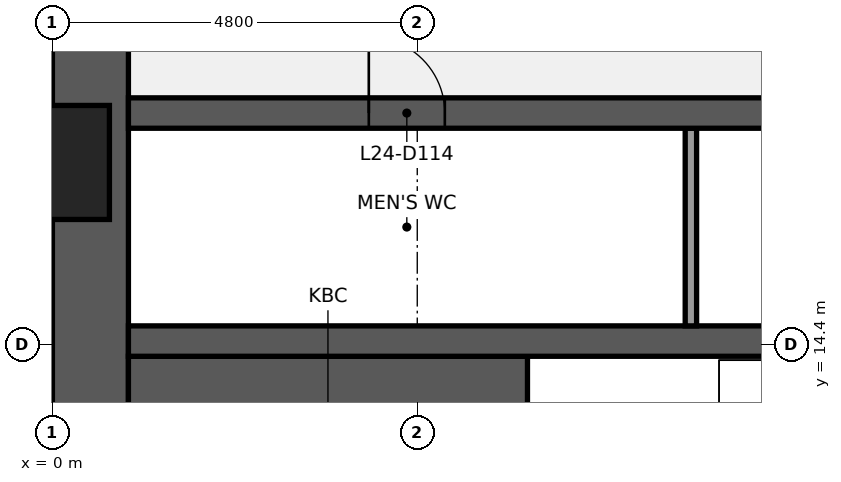
"""IFC4 building model, lengths in metres.
Left out: names, types, materials, properties, quantities, classifications, styles, units other than length and angle.
Written with IfcOpenShell. Run it as: python <this file> out.ifc"""

import sys

from ifc_helpers import new_model, si_unit, direction, frame, frame_2d, origin, place, context, subcontext, project, spatial, rectangle, extrude, element, fill, save


model = new_model("IFC4")
c1 = context("Model", 3, precision=1e-05, world=origin(), true_north=direction((0.0, 1.0)))
c2 = subcontext(c1, "Body", "Model", "MODEL_VIEW")
j1 = project(units=[si_unit("LENGTHUNIT", "METRE"), si_unit("PLANEANGLEUNIT", "RADIAN")], contexts=[c1])
p1 = place(None, origin())
s1 = spatial("IfcSite", under=j1, at=p1, CompositionType="ELEMENT")
p2 = place(p1, origin())
s2 = spatial("IfcBuilding", under=s1, at=p2, CompositionType="ELEMENT")
p3 = place(p2, frame((0.0, 0.0, 116.1)))
s3 = spatial("IfcBuildingStorey", under=s2, at=p3, CompositionType="ELEMENT", Elevation=116.1)
p4 = place(p3, frame((0.5, 9.6, 0.0), z_axis=(0.0, 0.0, 1.0), x_axis=(0.0, 1.0, 0.0)))
e1 = element("IfcWall", 1, at=p4, inside=s3, PredefinedType="SHEAR", context=c2, shape_type="SweptSolid", body=[
    extrude(rectangle(XDim=28.8, YDim=1.0, at=frame_2d((14.4, 0.0))), origin(), (0.0, 0.0, 1.0), 3.84),
])
p5 = place(p4, frame((8.85, 0.0, 0.9)))
e2 = element("IfcOpeningElement", 2, at=p5, cuts=e1, PredefinedType="OPENING", context=c2, shape_type="SweptSolid", body=[
    extrude(rectangle(XDim=1.5, YDim=1.5, at=frame_2d((0.75, 0.75))), frame((0.0, 0.51, 0.0), z_axis=(0.0, -1.0, 0.0), x_axis=(1.0, 0.0, 0.0)), (0.0, 0.0, 1.0), 1.02),
])
p6 = place(p4, frame((18.45, 0.0, 0.9)))
e3 = element("IfcOpeningElement", 3, at=p6, cuts=e1, PredefinedType="OPENING", context=c2, shape_type="SweptSolid", body=[
    extrude(rectangle(XDim=1.5, YDim=1.5, at=frame_2d((0.75, 0.75))), frame((0.0, 0.51, 0.0), z_axis=(0.0, -1.0, 0.0), x_axis=(1.0, 0.0, 0.0)), (0.0, 0.0, 1.0), 1.02),
])
p7 = place(p3, frame((1.0, 12.425, 0.0), z_axis=(0.0, 0.0, 1.0), x_axis=(1.0, 0.0, 0.0)))
e4 = element("IfcWall", 4, at=p7, inside=s3, PredefinedType="SHEAR", context=c2, shape_type="SweptSolid", body=[
    extrude(rectangle(XDim=5.25, YDim=3.65, at=frame_2d((2.625, 0.0))), origin(), (0.0, 0.0, 1.0), 3.84),
])
p8 = place(p3, frame((1.0, 14.45, 0.0), z_axis=(0.0, 0.0, 1.0), x_axis=(1.0, 0.0, 0.0)))
e5 = element("IfcWall", 5, at=p8, inside=s3, PredefinedType="SHEAR", context=c2, shape_type="SweptSolid", body=[
    extrude(rectangle(XDim=17.2, YDim=0.4, at=frame_2d((8.6, 0.0))), origin(), (0.0, 0.0, 1.0), 3.84),
])
p9 = place(p3, frame((8.4, 14.65, 0.0), z_axis=(0.0, 0.0, 1.0), x_axis=(0.0, 1.0, 0.0)))
e6 = element("IfcWall", 6, at=p9, inside=s3, PredefinedType="PARTITIONING", context=c2, shape_type="SweptSolid", body=[
    extrude(rectangle(XDim=2.6, YDim=0.15, at=frame_2d((1.3, 0.0))), origin(), (0.0, 0.0, 1.0), 3.84),
])
p10 = place(p3, frame((1.0, 17.45, 0.0), z_axis=(0.0, 0.0, 1.0), x_axis=(1.0, 0.0, 0.0)))
e7 = element("IfcWall", 7, at=p10, inside=s3, PredefinedType="SHEAR", context=c2, shape_type="SweptSolid", body=[
    extrude(rectangle(XDim=17.2, YDim=0.4, at=frame_2d((8.6, 0.0))), origin(), (0.0, 0.0, 1.0), 3.84),
])
p11 = place(p10, frame((3.163, 0.0, 0.0)))
e8 = element("IfcOpeningElement", 8, at=p11, cuts=e7, PredefinedType="OPENING", context=c2, shape_type="SweptSolid", body=[
    extrude(rectangle(XDim=1.0, YDim=2.1, at=frame_2d((0.5, 1.05))), frame((0.0, 0.21, 0.0), z_axis=(0.0, -1.0, 0.0), x_axis=(1.0, 0.0, 0.0)), (0.0, 0.0, 1.0), 0.42),
])
p12 = place(p10, frame((8.7, 0.0, 0.0)))
e9 = element("IfcOpeningElement", 9, at=p12, cuts=e7, PredefinedType="OPENING", context=c2, shape_type="SweptSolid", body=[
    extrude(rectangle(XDim=1.0, YDim=2.1, at=frame_2d((0.5, 1.05))), frame((0.0, 0.21, 0.0), z_axis=(0.0, -1.0, 0.0), x_axis=(1.0, 0.0, 0.0)), (0.0, 0.0, 1.0), 0.42),
])
p13 = place(p10, frame((12.0, 0.0, 0.0)))
e10 = element("IfcOpeningElement", 10, at=p13, cuts=e7, PredefinedType="OPENING", context=c2, shape_type="SweptSolid", body=[
    extrude(rectangle(XDim=1.0, YDim=2.1, at=frame_2d((0.5, 1.05))), frame((0.0, 0.21, 0.0), z_axis=(0.0, -1.0, 0.0), x_axis=(1.0, 0.0, 0.0)), (0.0, 0.0, 1.0), 0.42),
])
p14 = place(p10, frame((15.137, 0.0, 0.0)))
e11 = element("IfcOpeningElement", 11, at=p14, cuts=e7, PredefinedType="OPENING", context=c2, shape_type="SweptSolid", body=[
    extrude(rectangle(XDim=1.0, YDim=2.1, at=frame_2d((0.5, 1.05))), frame((0.0, 0.21, 0.0), z_axis=(0.0, -1.0, 0.0), x_axis=(1.0, 0.0, 0.0)), (0.0, 0.0, 1.0), 0.42),
])
p15 = place(p11, origin())
e12 = element("IfcDoor", 12, at=p15, inside=s3, OperationType="SINGLE_SWING_LEFT", PredefinedType="DOOR", context=c2, shape_type="SweptSolid", body=[
    extrude(rectangle(XDim=1.0, YDim=2.1, at=frame_2d((0.5, 1.05))), frame((0.0, 0.025, 0.0), z_axis=(0.0, -1.0, 0.0), x_axis=(1.0, 0.0, 0.0)), (0.0, 0.0, 1.0), 0.05),
])
fill(e8, e12)
save(model, sys.argv[1])
